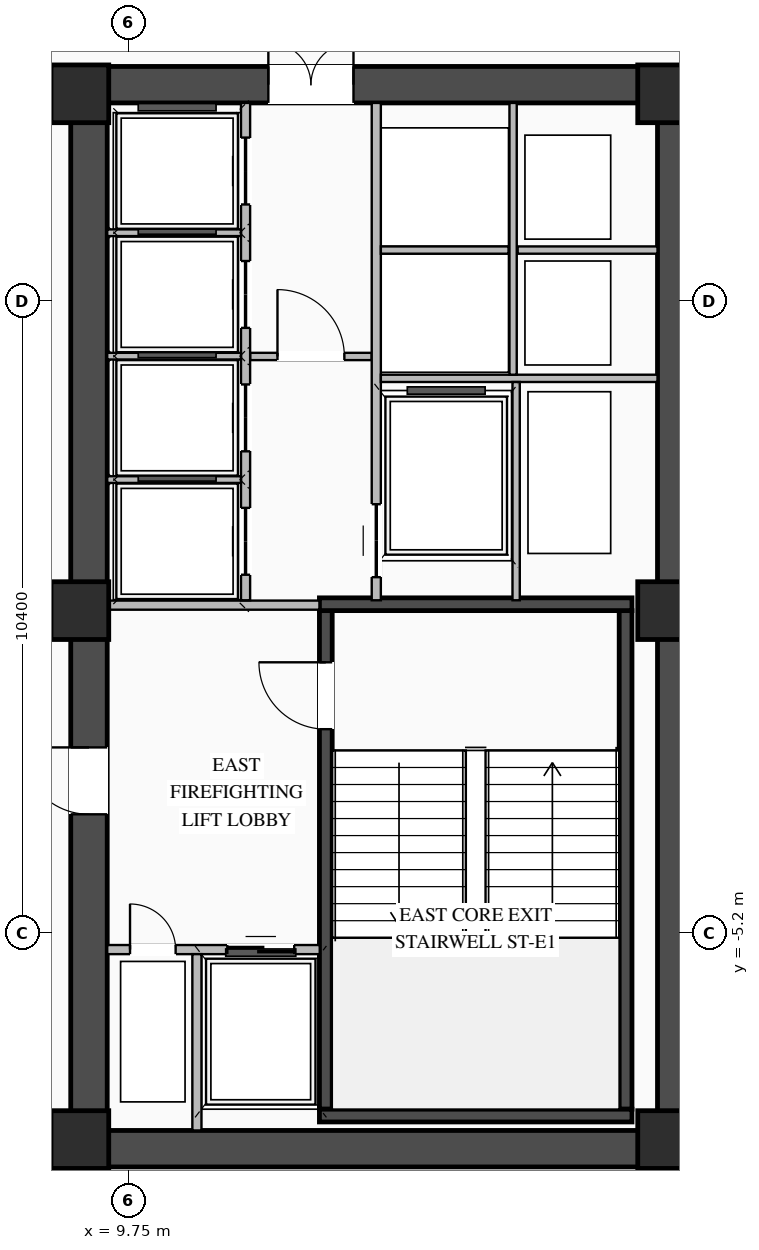
"""IFC4 building model, lengths in metres.
Left out: names, types, materials, properties, quantities, classifications, styles, units other than length and angle.
Written with IfcOpenShell. Run it as: python <this file> out.ifc"""

import sys

from ifc_helpers import new_model, si_unit, direction, frame, frame_2d, origin, origin_2d, place, context, subcontext, project, spatial, rectangle, extrude, element, fill, save


model = new_model("IFC4")
c1 = context("Model", 3, precision=1e-05, world=origin(), true_north=direction((0.0, 1.0)))
c2 = subcontext(c1, "Body", "Model", "MODEL_VIEW")
j1 = project(units=[si_unit("LENGTHUNIT", "METRE"), si_unit("PLANEANGLEUNIT", "RADIAN")], contexts=[c1])
p1 = place(None, origin())
s1 = spatial("IfcSite", under=j1, at=p1, CompositionType="ELEMENT")
p2 = place(p1, origin())
s2 = spatial("IfcBuilding", under=s1, at=p2, CompositionType="ELEMENT")
p3 = place(p2, frame((0.0, 0.0, 156.2)))
s3 = spatial("IfcBuildingStorey", under=s2, at=p3, CompositionType="ELEMENT", Elevation=156.2)
p4 = place(p3, frame((8.8, -8.75, 0.0), z_axis=(0.0, 0.0, 1.0), x_axis=(1.0, 0.0, 0.0)))
e1 = element("IfcWall", 1, at=p4, inside=s3, PredefinedType="SHEAR", context=c2, shape_type="SweptSolid", body=[
    extrude(rectangle(XDim=10.25, YDim=0.6, at=frame_2d((5.125, 0.0))), origin(), (0.0, 0.0, 1.0), 4.02),
])
p5 = place(p3, frame((8.8, 8.75, 0.0), z_axis=(0.0, 0.0, 1.0), x_axis=(1.0, 0.0, 0.0)))
e2 = element("IfcWall", 2, at=p5, inside=s3, PredefinedType="SHEAR", context=c2, shape_type="SweptSolid", body=[
    extrude(rectangle(XDim=10.25, YDim=0.6, at=frame_2d((5.125, 0.0))), origin(), (0.0, 0.0, 1.0), 4.02),
])
p6 = place(p5, frame((3.25, 0.0, 0.0)))
e3 = element("IfcOpeningElement", 3, at=p6, cuts=e2, PredefinedType="OPENING", context=c2, shape_type="SweptSolid", body=[
    extrude(rectangle(XDim=1.4, YDim=2.05, at=frame_2d((0.7, 1.025))), frame((0.0, 0.31, 0.0), z_axis=(0.0, -1.0, 0.0), x_axis=(1.0, 0.0, 0.0)), (0.0, 0.0, 1.0), 0.62),
])
p7 = place(p3, frame((9.1, -8.45, 0.0), z_axis=(0.0, 0.0, 1.0), x_axis=(0.0, 1.0, 0.0)))
e4 = element("IfcWall", 4, at=p7, inside=s3, PredefinedType="SHEAR", context=c2, shape_type="SweptSolid", body=[
    extrude(rectangle(XDim=16.9, YDim=0.6, at=frame_2d((8.45, 0.0))), origin(), (0.0, 0.0, 1.0), 4.02),
])
p8 = place(p7, frame((5.2, 0.0, 0.0)))
e5 = element("IfcOpeningElement", 5, at=p8, cuts=e4, PredefinedType="OPENING", context=c2, shape_type="SweptSolid", body=[
    extrude(rectangle(XDim=1.1, YDim=2.08, at=frame_2d((0.55, 1.04))), frame((0.0, 0.31, 0.0), z_axis=(0.0, -1.0, 0.0), x_axis=(1.0, 0.0, 0.0)), (0.0, 0.0, 1.0), 0.62),
])
p9 = place(p3, frame((18.75, -8.45, 0.0), z_axis=(0.0, 0.0, 1.0), x_axis=(0.0, 1.0, 0.0)))
e6 = element("IfcWall", 6, at=p9, inside=s3, PredefinedType="SHEAR", context=c2, shape_type="SweptSolid", body=[
    extrude(rectangle(XDim=16.9, YDim=0.6, at=frame_2d((8.45, 0.0))), origin(), (0.0, 0.0, 1.0), 4.02),
])
p10 = place(p3, frame((12.995, -8.1, 0.0), z_axis=(0.0, 0.0, 1.0), x_axis=(0.0, 1.0, 0.0)))
e7 = element("IfcWall", 7, at=p10, inside=s3, PredefinedType="SHEAR", context=c2, shape_type="SweptSolid", body=[
    extrude(rectangle(XDim=8.2, YDim=0.21, at=frame_2d((4.1, 0.0))), origin(), (0.0, 0.0, 1.0), 4.02),
])
p11 = place(p10, frame((6.25, 0.0, 0.0)))
e8 = element("IfcOpeningElement", 8, at=p11, cuts=e7, PredefinedType="OPENING", context=c2, shape_type="SweptSolid", body=[
    extrude(rectangle(XDim=1.1, YDim=2.15, at=frame_2d((0.55, 1.075))), frame((0.0, 0.115, 0.0), z_axis=(0.0, -1.0, 0.0), x_axis=(1.0, 0.0, 0.0)), (0.0, 0.0, 1.0), 0.23),
])
p12 = place(p3, frame((17.925, -8.1, 0.0), z_axis=(0.0, 0.0, 1.0), x_axis=(0.0, 1.0, 0.0)))
e9 = element("IfcWall", 9, at=p12, inside=s3, PredefinedType="SHEAR", context=c2, shape_type="SweptSolid", body=[
    extrude(rectangle(XDim=8.2, YDim=0.21, at=frame_2d((4.1, 0.0))), origin(), (0.0, 0.0, 1.0), 4.02),
])
for number, where, z_axis, x_axis in (
    (10, (12.89, -8.205, 0.0), (0.0, 0.0, 1.0), (1.0, 0.0, 0.0)),
    (11, (18.03, 0.205, 0.0), (0.0, 0.0, 1.0), (-1.0, 0.0, 0.0)),
):
    element("IfcWall", number, at=place(p3, frame(where, z_axis=z_axis, x_axis=x_axis)), inside=s3, PredefinedType="SHEAR", context=c2, shape_type="SweptSolid", body=[
        extrude(rectangle(XDim=5.14, YDim=0.21, at=frame_2d((2.57, 0.0))), origin(), (0.0, 0.0, 1.0), 4.02),
    ])
for number, where, z_axis, x_axis in (
    (12, (8.95, -8.6, 0.0), (0.0, 0.0, 1.0), (1.0, 0.0, 0.0)),
    (13, (8.95, 0.1, 0.0), (0.0, 0.0, 1.0), (1.0, 0.0, 0.0)),
    (14, (8.95, 8.6, 0.0), (0.0, 0.0, 1.0), (1.0, 0.0, 0.0)),
    (15, (18.6, -8.6, 0.0), (0.0, 0.0, 1.0), (1.0, 0.0, 0.0)),
    (16, (18.6, 0.1, 0.0), (0.0, 0.0, 1.0), (1.0, 0.0, 0.0)),
    (17, (18.6, 8.6, 0.0), (0.0, 0.0, 1.0), (1.0, 0.0, 0.0)),
):
    element("IfcColumn", number, at=place(p3, frame(where, z_axis=z_axis, x_axis=x_axis)), inside=s3, PredefinedType="COLUMN", context=c2, shape_type="SweptSolid", body=[
        extrude(rectangle(XDim=0.95, YDim=0.95, at=origin_2d()), origin(), (0.0, 0.0, 1.0), 4.2),
    ])
p13 = place(p3, frame((9.4, -5.475, 0.0), z_axis=(0.0, 0.0, 1.0), x_axis=(1.0, 0.0, 0.0)))
e18 = element("IfcWall", 18, at=p13, inside=s3, PredefinedType="STANDARD", context=c2, shape_type="SweptSolid", body=[
    extrude(rectangle(XDim=3.495, YDim=0.15, at=frame_2d((1.748, 0.0))), origin(), (0.0, 0.0, 1.0), 4.0),
])
p14 = place(p13, frame((1.975, 0.0, 0.0)))
e19 = element("IfcOpeningElement", 19, at=p14, cuts=e18, PredefinedType="OPENING", context=c2, shape_type="SweptSolid", body=[
    extrude(rectangle(XDim=1.1, YDim=2.15, at=frame_2d((0.55, 1.075))), frame((0.0, 0.085, 0.0), z_axis=(0.0, -1.0, 0.0), x_axis=(1.0, 0.0, 0.0)), (0.0, 0.0, 1.0), 0.17),
])
p15 = place(p13, frame((0.375, 0.0, 0.0)))
e20 = element("IfcOpeningElement", 20, at=p15, cuts=e18, PredefinedType="OPENING", context=c2, shape_type="SweptSolid", body=[
    extrude(rectangle(XDim=0.75, YDim=2.05, at=frame_2d((0.375, 1.025))), frame((0.0, 0.085, 0.0), z_axis=(0.0, -1.0, 0.0), x_axis=(1.0, 0.0, 0.0)), (0.0, 0.0, 1.0), 0.17),
])
p16 = place(p3, frame((10.875, -8.45, 0.0), z_axis=(0.0, 0.0, 1.0), x_axis=(0.0, 1.0, 0.0)))
e21 = element("IfcWall", 21, at=p16, inside=s3, PredefinedType="STANDARD", context=c2, shape_type="SweptSolid", body=[
    extrude(rectangle(XDim=2.9, YDim=0.15, at=frame_2d((1.45, 0.0))), origin(), (0.0, 0.0, 1.0), 4.0),
])
p17 = place(p3, frame((9.4, 0.19, 0.0), z_axis=(0.0, 0.0, 1.0), x_axis=(1.0, 0.0, 0.0)))
e22 = element("IfcWall", 22, at=p17, inside=s3, PredefinedType="STANDARD", context=c2, shape_type="SweptSolid", body=[
    extrude(rectangle(XDim=3.49, YDim=0.15, at=frame_2d((1.745, 0.0))), origin(), (0.0, 0.0, 1.0), 3.395),
])
p18 = place(p3, frame((11.75, 4.28, 0.0), z_axis=(0.0, 0.0, 1.0), x_axis=(1.0, 0.0, 0.0)))
e23 = element("IfcWall", 23, at=p18, inside=s3, PredefinedType="STANDARD", context=c2, shape_type="SweptSolid", body=[
    extrude(rectangle(XDim=2.0, YDim=0.12, at=frame_2d((1.0, 0.0))), origin(), (0.0, 0.0, 1.0), 4.0),
])
p19 = place(p18, frame((0.45, 0.0, 0.0)))
e24 = element("IfcOpeningElement", 24, at=p19, cuts=e23, PredefinedType="OPENING", context=c2, shape_type="SweptSolid", body=[
    extrude(rectangle(XDim=1.1, YDim=2.1, at=frame_2d((0.55, 1.05))), frame((0.0, 0.07, 0.0), z_axis=(0.0, -1.0, 0.0), x_axis=(1.0, 0.0, 0.0)), (0.0, 0.0, 1.0), 0.14),
])
p20 = place(p3, frame((11.675, 0.27, 0.0), z_axis=(0.0, 0.0, 1.0), x_axis=(0.0, 1.0, 0.0)))
e25 = element("IfcWall", 25, at=p20, inside=s3, PredefinedType="STANDARD", context=c2, shape_type="SweptSolid", body=[
    extrude(rectangle(XDim=8.18, YDim=0.15, at=frame_2d((4.09, 0.0))), origin(), (0.0, 0.0, 1.0), 4.0),
])
p21 = place(p20, frame((0.42, 0.0, 0.0)))
e26 = element("IfcOpeningElement", 26, at=p21, cuts=e25, PredefinedType="OPENING", context=c2, shape_type="SweptSolid", body=[
    extrude(rectangle(XDim=1.1, YDim=2.1, at=frame_2d((0.55, 1.05))), frame((0.0, 0.085, 0.0), z_axis=(0.0, -1.0, 0.0), x_axis=(1.0, 0.0, 0.0)), (0.0, 0.0, 1.0), 0.17),
])
p22 = place(p20, frame((2.45, 0.0, 0.0)))
e27 = element("IfcOpeningElement", 27, at=p22, cuts=e25, PredefinedType="OPENING", context=c2, shape_type="SweptSolid", body=[
    extrude(rectangle(XDim=1.1, YDim=2.1, at=frame_2d((0.55, 1.05))), frame((0.0, 0.085, 0.0), z_axis=(0.0, -1.0, 0.0), x_axis=(1.0, 0.0, 0.0)), (0.0, 0.0, 1.0), 0.17),
])
p23 = place(p20, frame((4.48, 0.0, 0.0)))
e28 = element("IfcOpeningElement", 28, at=p23, cuts=e25, PredefinedType="OPENING", context=c2, shape_type="SweptSolid", body=[
    extrude(rectangle(XDim=1.1, YDim=2.1, at=frame_2d((0.55, 1.05))), frame((0.0, 0.085, 0.0), z_axis=(0.0, -1.0, 0.0), x_axis=(1.0, 0.0, 0.0)), (0.0, 0.0, 1.0), 0.17),
])
p24 = place(p20, frame((6.51, 0.0, 0.0)))
e29 = element("IfcOpeningElement", 29, at=p24, cuts=e25, PredefinedType="OPENING", context=c2, shape_type="SweptSolid", body=[
    extrude(rectangle(XDim=1.1, YDim=2.1, at=frame_2d((0.55, 1.05))), frame((0.0, 0.085, 0.0), z_axis=(0.0, -1.0, 0.0), x_axis=(1.0, 0.0, 0.0)), (0.0, 0.0, 1.0), 0.17),
])
for number, where, z_axis, x_axis in (
    (30, (9.4, 2.255, 0.0), (0.0, 0.0, 1.0), (1.0, 0.0, 0.0)),
    (31, (9.4, 4.285, 0.0), (0.0, 0.0, 1.0), (1.0, 0.0, 0.0)),
    (32, (9.4, 6.315, 0.0), (0.0, 0.0, 1.0), (1.0, 0.0, 0.0)),
):
    element("IfcWall", number, at=place(p3, frame(where, z_axis=z_axis, x_axis=x_axis)), inside=s3, PredefinedType="STANDARD", context=c2, shape_type="SweptSolid", body=[
        extrude(rectangle(XDim=2.2, YDim=0.11, at=frame_2d((1.1, 0.0))), origin(), (0.0, 0.0, 1.0), 4.0),
    ])
p25 = place(p3, frame((13.825, 0.27, 0.0), z_axis=(0.0, 0.0, 1.0), x_axis=(0.0, 1.0, 0.0)))
e33 = element("IfcWall", 33, at=p25, inside=s3, PredefinedType="STANDARD", context=c2, shape_type="SweptSolid", body=[
    extrude(rectangle(XDim=8.18, YDim=0.15, at=frame_2d((4.09, 0.0))), origin(), (0.0, 0.0, 1.0), 4.0),
])
p26 = place(p25, frame((0.38, 0.0, 0.0)))
e34 = element("IfcOpeningElement", 34, at=p26, cuts=e33, PredefinedType="OPENING", context=c2, shape_type="SweptSolid", body=[
    extrude(rectangle(XDim=1.2, YDim=2.1, at=frame_2d((0.6, 1.05))), frame((0.0, 0.085, 0.0), z_axis=(0.0, -1.0, 0.0), x_axis=(1.0, 0.0, 0.0)), (0.0, 0.0, 1.0), 0.17),
])
p27 = place(p3, frame((13.9, 3.92, 0.0), z_axis=(0.0, 0.0, 1.0), x_axis=(1.0, 0.0, 0.0)))
e35 = element("IfcWall", 35, at=p27, inside=s3, PredefinedType="STANDARD", context=c2, shape_type="SweptSolid", body=[
    extrude(rectangle(XDim=4.55, YDim=0.12, at=frame_2d((2.275, 0.0))), origin(), (0.0, 0.0, 1.0), 4.0),
])
p28 = place(p3, frame((16.15, 6.03, 0.0), z_axis=(0.0, 0.0, 1.0), x_axis=(1.0, 0.0, 0.0)))
e36 = element("IfcWall", 36, at=p28, inside=s3, PredefinedType="STANDARD", context=c2, shape_type="SweptSolid", body=[
    extrude(rectangle(XDim=2.3, YDim=0.12, at=frame_2d((1.15, 0.0))), origin(), (0.0, 0.0, 1.0), 4.0),
])
p29 = place(p3, frame((16.075, 3.98, 0.0), z_axis=(0.0, 0.0, 1.0), x_axis=(0.0, 1.0, 0.0)))
e37 = element("IfcWall", 37, at=p29, inside=s3, PredefinedType="STANDARD", context=c2, shape_type="SweptSolid", body=[
    extrude(rectangle(XDim=4.47, YDim=0.12, at=frame_2d((2.235, 0.0))), origin(), (0.0, 0.0, 1.0), 4.0),
])
p30 = place(p3, frame((13.9, 6.03, 0.0), z_axis=(0.0, 0.0, 1.0), x_axis=(1.0, 0.0, 0.0)))
e38 = element("IfcWall", 38, at=p30, inside=s3, PredefinedType="STANDARD", context=c2, shape_type="SweptSolid", body=[
    extrude(rectangle(XDim=2.1, YDim=0.12, at=frame_2d((1.05, 0.0))), origin(), (0.0, 0.0, 1.0), 4.0),
])
p31 = place(p3, frame((16.125, 0.27, 0.0), z_axis=(0.0, 0.0, 1.0), x_axis=(0.0, 1.0, 0.0)))
e39 = element("IfcWall", 39, at=p31, inside=s3, PredefinedType="STANDARD", context=c2, shape_type="SweptSolid", body=[
    extrude(rectangle(XDim=3.59, YDim=0.12, at=frame_2d((1.795, 0.0))), origin(), (0.0, 0.0, 1.0), 4.0),
])
p32 = place(p11, origin())
e40 = element("IfcDoor", 40, at=p32, inside=s3, OperationType="SINGLE_SWING_RIGHT", PredefinedType="DOOR", context=c2, shape_type="SweptSolid", body=[
    extrude(rectangle(XDim=1.1, YDim=2.15, at=frame_2d((0.55, 1.075))), frame((0.0, 0.025, 0.0), z_axis=(0.0, -1.0, 0.0), x_axis=(1.0, 0.0, 0.0)), (0.0, 0.0, 1.0), 0.05),
])
fill(e8, e40)
p33 = place(p14, origin())
e41 = element("IfcDoor", 41, at=p33, inside=s3, OperationType="DOUBLE_DOOR_SLIDING", PredefinedType="DOOR", context=c2, shape_type="SweptSolid", body=[
    extrude(rectangle(XDim=1.1, YDim=2.15, at=frame_2d((0.55, 1.075))), frame((0.0, 0.025, 0.0), z_axis=(0.0, -1.0, 0.0), x_axis=(1.0, 0.0, 0.0)), (0.0, 0.0, 1.0), 0.05),
])
fill(e19, e41)
p34 = place(p15, origin())
e42 = element("IfcDoor", 42, at=p34, inside=s3, OperationType="SINGLE_SWING_LEFT", PredefinedType="DOOR", context=c2, shape_type="SweptSolid", body=[
    extrude(rectangle(XDim=0.75, YDim=2.05, at=frame_2d((0.375, 1.025))), frame((0.0, 0.025, 0.0), z_axis=(0.0, -1.0, 0.0), x_axis=(1.0, 0.0, 0.0)), (0.0, 0.0, 1.0), 0.05),
])
fill(e20, e42)
p35 = place(p8, origin())
e43 = element("IfcDoor", 43, at=p35, inside=s3, OperationType="SINGLE_SWING_RIGHT", PredefinedType="DOOR", context=c2, shape_type="SweptSolid", body=[
    extrude(rectangle(XDim=1.1, YDim=2.08, at=frame_2d((0.55, 1.04))), frame((0.0, -0.205, 0.0), z_axis=(0.0, -1.0, 0.0), x_axis=(1.0, 0.0, 0.0)), (0.0, 0.0, 1.0), 0.05),
])
fill(e5, e43)
p36 = place(p19, origin())
e44 = element("IfcDoor", 44, at=p36, inside=s3, OperationType="SINGLE_SWING_LEFT", PredefinedType="DOOR", context=c2, shape_type="SweptSolid", body=[
    extrude(rectangle(XDim=1.1, YDim=2.1, at=frame_2d((0.55, 1.05))), frame((0.0, 0.025, 0.0), z_axis=(0.0, -1.0, 0.0), x_axis=(1.0, 0.0, 0.0)), (0.0, 0.0, 1.0), 0.05),
])
fill(e24, e44)
p37 = place(p6, origin())
e45 = element("IfcDoor", 45, at=p37, inside=s3, OperationType="DOUBLE_DOOR_SINGLE_SWING", PredefinedType="DOOR", context=c2, shape_type="SweptSolid", body=[
    extrude(rectangle(XDim=1.4, YDim=2.05, at=frame_2d((0.7, 1.025))), frame((0.0, 0.245, 0.0), z_axis=(0.0, -1.0, 0.0), x_axis=(1.0, 0.0, 0.0)), (0.0, 0.0, 1.0), 0.05),
])
fill(e3, e45)
p38 = place(p21, origin())
e46 = element("IfcDoor", 46, at=p38, inside=s3, OperationType="DOUBLE_DOOR_SLIDING", PredefinedType="DOOR", context=c2, shape_type="SweptSolid", body=[
    extrude(rectangle(XDim=1.1, YDim=2.1, at=frame_2d((0.55, 1.05))), frame((0.0, 0.025, 0.0), z_axis=(0.0, -1.0, 0.0), x_axis=(1.0, 0.0, 0.0)), (0.0, 0.0, 1.0), 0.05),
])
fill(e26, e46)
p39 = place(p22, origin())
e47 = element("IfcDoor", 47, at=p39, inside=s3, OperationType="DOUBLE_DOOR_SLIDING", PredefinedType="DOOR", context=c2, shape_type="SweptSolid", body=[
    extrude(rectangle(XDim=1.1, YDim=2.1, at=frame_2d((0.55, 1.05))), frame((0.0, 0.025, 0.0), z_axis=(0.0, -1.0, 0.0), x_axis=(1.0, 0.0, 0.0)), (0.0, 0.0, 1.0), 0.05),
])
fill(e27, e47)
p40 = place(p23, origin())
e48 = element("IfcDoor", 48, at=p40, inside=s3, OperationType="DOUBLE_DOOR_SLIDING", PredefinedType="DOOR", context=c2, shape_type="SweptSolid", body=[
    extrude(rectangle(XDim=1.1, YDim=2.1, at=frame_2d((0.55, 1.05))), frame((0.0, 0.025, 0.0), z_axis=(0.0, -1.0, 0.0), x_axis=(1.0, 0.0, 0.0)), (0.0, 0.0, 1.0), 0.05),
])
fill(e28, e48)
p41 = place(p24, origin())
e49 = element("IfcDoor", 49, at=p41, inside=s3, OperationType="DOUBLE_DOOR_SLIDING", PredefinedType="DOOR", context=c2, shape_type="SweptSolid", body=[
    extrude(rectangle(XDim=1.1, YDim=2.1, at=frame_2d((0.55, 1.05))), frame((0.0, 0.025, 0.0), z_axis=(0.0, -1.0, 0.0), x_axis=(1.0, 0.0, 0.0)), (0.0, 0.0, 1.0), 0.05),
])
fill(e29, e49)
p42 = place(p26, origin())
e50 = element("IfcDoor", 50, at=p42, inside=s3, OperationType="DOUBLE_DOOR_SLIDING", PredefinedType="DOOR", context=c2, shape_type="SweptSolid", body=[
    extrude(rectangle(XDim=1.2, YDim=2.1, at=frame_2d((0.6, 1.05))), frame((0.0, 0.025, 0.0), z_axis=(0.0, -1.0, 0.0), x_axis=(1.0, 0.0, 0.0)), (0.0, 0.0, 1.0), 0.05),
])
fill(e34, e50)
save(model, sys.argv[1])
